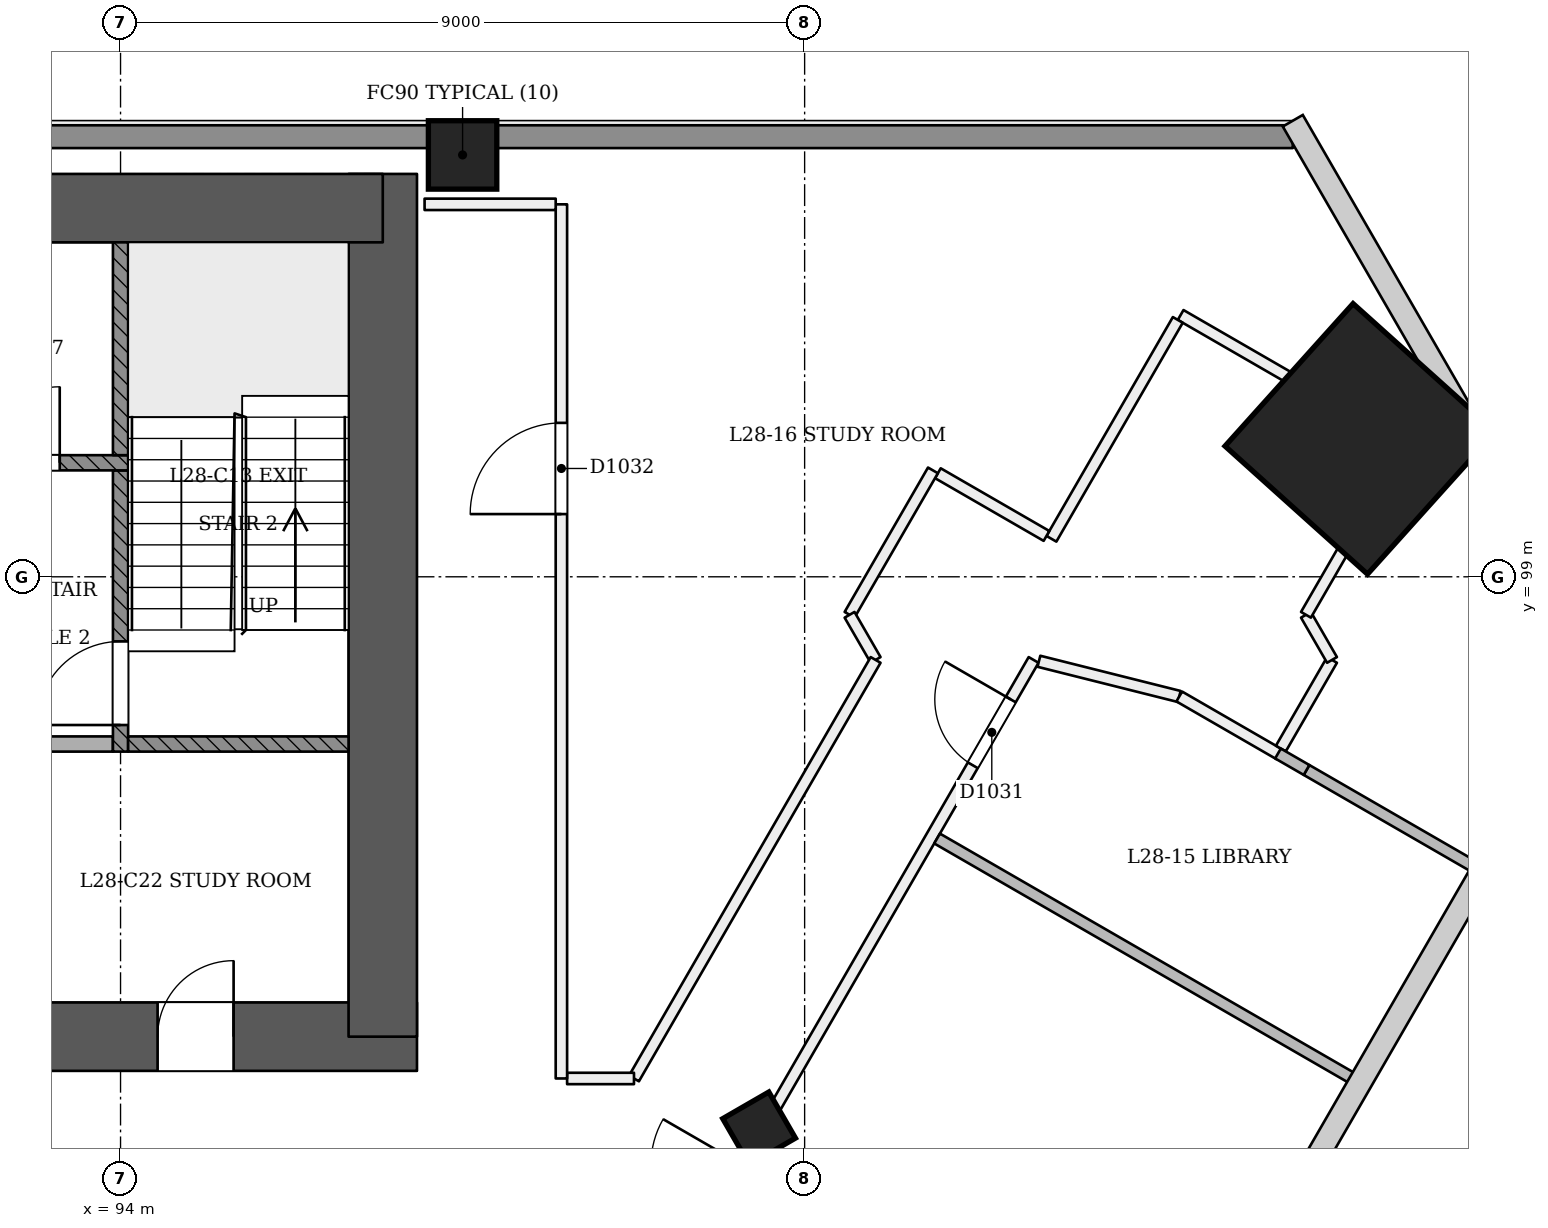
"""IFC4 building model, lengths in metres.
Left out: names, types, materials, properties, quantities, classifications, styles, units other than length and angle.
Written with IfcOpenShell. Run it as: python <this file> out.ifc"""

import sys

from ifc_helpers import new_model, si_unit, direction, frame, frame_2d, origin, origin_2d, place, context, subcontext, project, spatial, rectangle, extrude, element, fill, save


model = new_model("IFC4")
c1 = context("Model", 3, precision=1e-05, world=origin(), true_north=direction((0.0, 1.0)))
c2 = subcontext(c1, "Body", "Model", "MODEL_VIEW")
j1 = project(units=[si_unit("LENGTHUNIT", "METRE"), si_unit("PLANEANGLEUNIT", "RADIAN")], contexts=[c1])
p1 = place(None, origin())
s1 = spatial("IfcSite", under=j1, at=p1, CompositionType="ELEMENT")
p2 = place(p1, origin())
s2 = spatial("IfcBuilding", under=s1, at=p2, CompositionType="ELEMENT")
p3 = place(p2, frame((0.0, 0.0, 111.6)))
s3 = spatial("IfcBuildingStorey", under=s2, at=p3, CompositionType="ELEMENT", Elevation=111.6)
p4 = place(p3, frame((72.55, 92.95, 0.0), z_axis=(0.0, 0.0, 1.0), x_axis=(1.0, 0.0, 0.0)))
e1 = element("IfcWall", 1, at=p4, inside=s3, PredefinedType="SHEAR", context=c2, shape_type="SweptSolid", body=[
    extrude(rectangle(XDim=25.35, YDim=0.9, at=frame_2d((12.675, 0.0))), origin(), (0.0, 0.0, 1.0), 3.6),
])
p5 = place(p4, frame((1.25, 0.0, 0.0)))
e2 = element("IfcOpeningElement", 2, at=p5, cuts=e1, PredefinedType="OPENING", context=c2, shape_type="SweptSolid", body=[
    extrude(rectangle(XDim=1.2, YDim=2.1, at=frame_2d((0.6, 1.05))), frame((0.0, 0.46, 0.0), z_axis=(0.0, -1.0, 0.0), x_axis=(1.0, 0.0, 0.0)), (0.0, 0.0, 1.0), 0.921),
])
p6 = place(p4, frame((3.45, 0.0, 0.0)))
e3 = element("IfcOpeningElement", 3, at=p6, cuts=e1, PredefinedType="OPENING", context=c2, shape_type="SweptSolid", body=[
    extrude(rectangle(XDim=1.2, YDim=2.1, at=frame_2d((0.6, 1.05))), frame((0.0, 0.46, 0.0), z_axis=(0.0, -1.0, 0.0), x_axis=(1.0, 0.0, 0.0)), (0.0, 0.0, 1.0), 0.921),
])
p7 = place(p4, frame((13.45, 0.0, 0.0)))
e4 = element("IfcOpeningElement", 4, at=p7, cuts=e1, PredefinedType="OPENING", context=c2, shape_type="SweptSolid", body=[
    extrude(rectangle(XDim=1.2, YDim=2.1, at=frame_2d((0.6, 1.05))), frame((0.0, 0.46, 0.0), z_axis=(0.0, -1.0, 0.0), x_axis=(1.0, 0.0, 0.0)), (0.0, 0.0, 1.0), 0.921),
])
p8 = place(p4, frame((15.712, 0.0, 0.0)))
e5 = element("IfcOpeningElement", 5, at=p8, cuts=e1, PredefinedType="OPENING", context=c2, shape_type="SweptSolid", body=[
    extrude(rectangle(XDim=1.0, YDim=2.1, at=frame_2d((0.5, 1.05))), frame((0.0, 0.46, 0.0), z_axis=(0.0, -1.0, 0.0), x_axis=(1.0, 0.0, 0.0)), (0.0, 0.0, 1.0), 0.921),
])
p9 = place(p4, frame((18.35, 0.0, 0.0)))
e6 = element("IfcOpeningElement", 6, at=p9, cuts=e1, PredefinedType="OPENING", context=c2, shape_type="SweptSolid", body=[
    extrude(rectangle(XDim=1.0, YDim=2.1, at=frame_2d((0.5, 1.05))), frame((0.0, 0.46, 0.0), z_axis=(0.0, -1.0, 0.0), x_axis=(1.0, 0.0, 0.0)), (0.0, 0.0, 1.0), 0.921),
])
p10 = place(p4, frame((21.938, 0.0, 0.0)))
e7 = element("IfcOpeningElement", 7, at=p10, cuts=e1, PredefinedType="OPENING", context=c2, shape_type="SweptSolid", body=[
    extrude(rectangle(XDim=1.0, YDim=2.1, at=frame_2d((0.5, 1.05))), frame((0.0, 0.46, 0.0), z_axis=(0.0, -1.0, 0.0), x_axis=(1.0, 0.0, 0.0)), (0.0, 0.0, 1.0), 0.921),
])
p11 = place(p3, frame((97.45, 92.95, 0.0), z_axis=(0.0, 0.0, 1.0), x_axis=(0.0, 1.0, 0.0)))
e8 = element("IfcWall", 8, at=p11, inside=s3, PredefinedType="SHEAR", context=c2, shape_type="SweptSolid", body=[
    extrude(rectangle(XDim=11.35, YDim=0.9, at=frame_2d((5.675, 0.0))), origin(), (0.0, 0.0, 1.0), 3.6),
])
p12 = place(p3, frame((97.45, 103.85, 0.0), z_axis=(0.0, 0.0, 1.0), x_axis=(-1.0, 0.0, 0.0)))
e9 = element("IfcWall", 9, at=p12, inside=s3, PredefinedType="SHEAR", context=c2, shape_type="SweptSolid", body=[
    extrude(rectangle(XDim=25.35, YDim=0.9, at=frame_2d((12.675, 0.0))), origin(), (0.0, 0.0, 1.0), 3.6),
])
p13 = place(p3, frame((102.428, 91.696, -0.021), z_axis=(-0.022155133694, 0.038483534979, 0.999013597298), x_axis=(-0.501317552426, -0.864978472218, 0.022202572572)))
e10 = element("IfcColumn", 10, at=p13, inside=s3, PredefinedType="COLUMN", context=c2, shape_type="SweptSolid", body=[
    extrude(rectangle(XDim=0.7, YDim=0.7, at=origin_2d()), origin(), (0.0, 0.0, 1.0), 3.604),
])
p14 = place(p3, frame((110.344, 100.803, 0.0), z_axis=(-0.028336004223, 0.009219369795, 0.999555938447), x_axis=(0.500148463849, -0.865656006757, 0.022162853497)))
e11 = element("IfcColumn", 11, at=p14, inside=s3, PredefinedType="COLUMN", context=c2, shape_type="SweptSolid", body=[
    extrude(rectangle(XDim=2.52, YDim=2.52, at=origin_2d()), origin(), (0.0, 0.0, 1.0), 3.602),
])
p15 = place(p3, frame((98.5, 104.55, 0.0), z_axis=(0.0, 0.0, 1.0), x_axis=(1.0, 0.0, 0.0)))
e12 = element("IfcColumn", 12, at=p15, inside=s3, PredefinedType="COLUMN", context=c2, shape_type="SweptSolid", body=[
    extrude(rectangle(XDim=0.9, YDim=0.9, at=origin_2d()), origin(), (0.0, 0.0, 1.0), 3.6),
])
p16 = place(p3, frame((85.343, 62.105, 0.0), z_axis=(0.0, 0.0, 1.0), x_axis=(0.500001579174, 0.866024492046, 0.0)))
e13 = element("IfcWall", 13, at=p16, inside=s3, PredefinedType="PARTITIONING", context=c2, shape_type="SweptSolid", body=[
    extrude(rectangle(XDim=41.339, YDim=0.15, at=frame_2d((20.669, 0.0))), origin(), (0.0, 0.0, 1.0), 2.7),
])
p17 = place(p16, frame((0.312, 0.0, 0.0)))
e14 = element("IfcOpeningElement", 14, at=p17, cuts=e13, PredefinedType="OPENING", context=c2, shape_type="SweptSolid", body=[
    extrude(rectangle(XDim=1.2, YDim=2.1, at=frame_2d((0.6, 1.05))), frame((0.0, 0.085, 0.0), z_axis=(0.0, -1.0, 0.0), x_axis=(1.0, 0.0, 0.0)), (0.0, 0.0, 1.0), 0.171),
])
p18 = place(p16, frame((8.82, 0.0, 0.0)))
e15 = element("IfcOpeningElement", 15, at=p18, cuts=e13, PredefinedType="OPENING", context=c2, shape_type="SweptSolid", body=[
    extrude(rectangle(XDim=1.2, YDim=2.1, at=frame_2d((0.6, 1.05))), frame((0.0, 0.085, 0.0), z_axis=(0.0, -1.0, 0.0), x_axis=(1.0, 0.0, 0.0)), (0.0, 0.0, 1.0), 0.171),
])
p19 = place(p16, frame((22.32, 0.0, 0.0)))
e16 = element("IfcOpeningElement", 16, at=p19, cuts=e13, PredefinedType="OPENING", context=c2, shape_type="SweptSolid", body=[
    extrude(rectangle(XDim=1.2, YDim=2.1, at=frame_2d((0.6, 1.05))), frame((0.0, 0.085, 0.0), z_axis=(0.0, -1.0, 0.0), x_axis=(1.0, 0.0, 0.0)), (0.0, 0.0, 1.0), 0.171),
])
p20 = place(p16, frame((32.47, 0.0, 0.0)))
e17 = element("IfcOpeningElement", 17, at=p20, cuts=e13, PredefinedType="OPENING", context=c2, shape_type="SweptSolid", body=[
    extrude(rectangle(XDim=1.2, YDim=2.1, at=frame_2d((0.6, 1.05))), frame((0.0, 0.085, 0.0), z_axis=(0.0, -1.0, 0.0), x_axis=(1.0, 0.0, 0.0)), (0.0, 0.0, 1.0), 0.171),
])
p21 = place(p16, frame((39.739, 0.0, 0.0)))
e18 = element("IfcOpeningElement", 18, at=p21, cuts=e13, PredefinedType="OPENING", context=c2, shape_type="SweptSolid", body=[
    extrude(rectangle(XDim=1.0, YDim=2.1, at=frame_2d((0.5, 1.05))), frame((0.0, 0.085, 0.0), z_axis=(0.0, -1.0, 0.0), x_axis=(1.0, 0.0, 0.0)), (0.0, 0.0, 1.0), 0.171),
])
p22 = place(p3, frame((106.082, 97.889, 0.0), z_axis=(0.0, 0.0, 1.0), x_axis=(0.969923333145, -0.24341061567, 0.0)))
e19 = element("IfcWall", 19, at=p22, inside=s3, PredefinedType="PARTITIONING", context=c2, shape_type="SweptSolid", body=[
    extrude(rectangle(XDim=1.904, YDim=0.15, at=frame_2d((0.952, 0.0))), origin(), (0.0, 0.0, 1.0), 3.1),
])
p23 = place(p3, frame((107.929, 97.425, 0.0), z_axis=(0.0, 0.0, 1.0), x_axis=(0.866030456496, -0.499991248344, 0.0)))
e20 = element("IfcWall", 20, at=p23, inside=s3, PredefinedType="PARTITIONING", context=c2, shape_type="SweptSolid", body=[
    extrude(rectangle(XDim=1.52, YDim=0.15, at=frame_2d((0.76, 0.0))), origin(), (0.0, 0.0, 1.0), 2.6),
])
p24 = place(p3, frame((109.265, 96.74, 0.0), z_axis=(0.0, 0.0, 1.0), x_axis=(0.500078207394, 0.865980246016, 0.0)))
e21 = element("IfcWall", 21, at=p24, inside=s3, PredefinedType="PARTITIONING", context=c2, shape_type="SweptSolid", body=[
    extrude(rectangle(XDim=1.346, YDim=0.15, at=frame_2d((0.673, 0.0))), origin(), (0.0, 0.0, 1.0), 2.6),
])
p25 = place(p3, frame((109.938, 97.906, 0.0), z_axis=(0.0, 0.0, 1.0), x_axis=(-0.500236074689, 0.865889063091, 0.0)))
e22 = element("IfcWall", 22, at=p25, inside=s3, PredefinedType="PARTITIONING", context=c2, shape_type="SweptSolid", body=[
    extrude(rectangle(XDim=0.686, YDim=0.15, at=frame_2d((0.343, 0.0))), origin(), (0.0, 0.0, 1.0), 2.6),
])
p26 = place(p3, frame((109.595, 98.5, 0.0), z_axis=(0.0, 0.0, 1.0), x_axis=(0.500072327845, 0.865983641256, 0.0)))
e23 = element("IfcWall", 23, at=p26, inside=s3, PredefinedType="PARTITIONING", context=c2, shape_type="SweptSolid", body=[
    extrude(rectangle(XDim=2.517, YDim=0.15, at=frame_2d((1.258, 0.0))), origin(), (0.0, 0.0, 1.0), 2.6),
])
p27 = place(p3, frame((110.891, 100.744, 0.0), z_axis=(0.0, 0.0, 1.0), x_axis=(-0.865989465428, 0.500062241894, 0.0)))
e24 = element("IfcWall", 24, at=p27, inside=s3, PredefinedType="PARTITIONING", context=c2, shape_type="SweptSolid", body=[
    extrude(rectangle(XDim=3.4, YDim=0.15, at=frame_2d((1.7, 0.0))), origin(), (0.0, 0.0, 1.0), 2.6),
])
p28 = place(p3, frame((107.909, 102.38, 0.0), z_axis=(0.0, 0.0, 1.0), x_axis=(-0.500008456887, -0.866020521143, 0.0)))
e25 = element("IfcWall", 25, at=p28, inside=s3, PredefinedType="PARTITIONING", context=c2, shape_type="SweptSolid", body=[
    extrude(rectangle(XDim=3.325, YDim=0.15, at=frame_2d((1.663, 0.0))), origin(), (0.0, 0.0, 1.0), 2.6),
])
p29 = place(p3, frame((106.182, 99.538, 0.0), z_axis=(0.0, 0.0, 1.0), x_axis=(-0.866040211805, 0.499974350878, 0.0)))
e26 = element("IfcWall", 26, at=p29, inside=s3, PredefinedType="PARTITIONING", context=c2, shape_type="SweptSolid", body=[
    extrude(rectangle(XDim=1.65, YDim=0.15, at=frame_2d((0.825, 0.0))), origin(), (0.0, 0.0, 1.0), 3.1),
])
p30 = place(p3, frame((104.688, 100.4, 0.0), z_axis=(0.0, 0.0, 1.0), x_axis=(-0.500005024956, -0.866022502605, 0.0)))
e27 = element("IfcWall", 27, at=p30, inside=s3, PredefinedType="PARTITIONING", context=c2, shape_type="SweptSolid", body=[
    extrude(rectangle(XDim=2.194, YDim=0.15, at=frame_2d((1.097, 0.0))), origin(), (0.0, 0.0, 1.0), 3.1),
])
p31 = place(p3, frame((103.591, 98.5, 0.0), z_axis=(0.0, 0.0, 1.0), x_axis=(0.499969057507, -0.866043267704, 0.0)))
e28 = element("IfcWall", 28, at=p31, inside=s3, PredefinedType="PARTITIONING", context=c2, shape_type="SweptSolid", body=[
    extrude(rectangle(XDim=0.686, YDim=0.15, at=frame_2d((0.343, 0.0))), origin(), (0.0, 0.0, 1.0), 3.1),
])
p32 = place(p3, frame((103.934, 97.906, 0.0), z_axis=(0.0, 0.0, 1.0), x_axis=(-0.499983931063, -0.866034680991, 0.0)))
e29 = element("IfcWall", 29, at=p32, inside=s3, PredefinedType="PARTITIONING", context=c2, shape_type="SweptSolid", body=[
    extrude(rectangle(XDim=6.358, YDim=0.15, at=frame_2d((3.179, 0.0))), origin(), (0.0, 0.0, 1.0), 3.1),
])
p33 = place(p3, frame((100.755, 92.4, 0.0), z_axis=(0.0, 0.0, 1.0), x_axis=(-1.0, 0.0, 0.0)))
e30 = element("IfcWall", 30, at=p33, inside=s3, PredefinedType="PARTITIONING", context=c2, shape_type="SweptSolid", body=[
    extrude(rectangle(XDim=0.88, YDim=0.15, at=frame_2d((0.44, 0.0))), origin(), (0.0, 0.0, 1.0), 3.1),
])
p34 = place(p3, frame((99.8, 92.4, 0.0), z_axis=(0.0, 0.0, 1.0), x_axis=(0.0, 1.0, 0.0)))
e31 = element("IfcWall", 31, at=p34, inside=s3, PredefinedType="PARTITIONING", context=c2, shape_type="SweptSolid", body=[
    extrude(rectangle(XDim=11.5, YDim=0.15, at=frame_2d((5.75, 0.0))), origin(), (0.0, 0.0, 1.0), 2.6),
])
p35 = place(p34, frame((7.425, 0.0, 0.0)))
e32 = element("IfcOpeningElement", 32, at=p35, cuts=e31, PredefinedType="OPENING", context=c2, shape_type="SweptSolid", body=[
    extrude(rectangle(XDim=1.2, YDim=2.1, at=frame_2d((0.6, 1.05))), frame((0.0, 0.085, 0.0), z_axis=(0.0, -1.0, 0.0), x_axis=(1.0, 0.0, 0.0)), (0.0, 0.0, 1.0), 0.171),
])
p36 = place(p3, frame((99.725, 103.9, 0.0), z_axis=(0.0, 0.0, 1.0), x_axis=(-1.0, 0.0, 0.0)))
e33 = element("IfcWall", 33, at=p36, inside=s3, PredefinedType="PARTITIONING", context=c2, shape_type="SweptSolid", body=[
    extrude(rectangle(XDim=1.725, YDim=0.15, at=frame_2d((0.863, 0.0))), origin(), (0.0, 0.0, 1.0), 2.6),
])
p37 = place(p3, frame((110.22, 92.394, 0.0), z_axis=(0.0, 0.0, 1.0), x_axis=(-0.866015887322, 0.500016482634, 0.0)))
e34 = element("IfcWall", 34, at=p37, inside=s3, PredefinedType="PARTITIONING", context=c2, shape_type="SweptSolid", body=[
    extrude(rectangle(XDim=6.325, YDim=0.15, at=frame_2d((3.163, 0.0))), origin(), (0.0, 0.0, 1.0), 2.6),
])
p38 = place(p3, frame((111.826, 95.175, 0.0), z_axis=(0.0, 0.0, 1.0), x_axis=(-0.866009728883, 0.500027148743, 0.0)))
e35 = element("IfcWall", 35, at=p38, inside=s3, PredefinedType="PARTITIONING", context=c2, shape_type="SweptSolid", body=[
    extrude(rectangle(XDim=2.566, YDim=0.15, at=frame_2d((1.283, 0.0))), origin(), (0.0, 0.0, 1.0), 3.1),
])
p39 = place(p3, frame((109.603, 96.458, 0.0), z_axis=(0.0, 0.0, 1.0), x_axis=(-0.866016800201, 0.500014901547, 0.0)))
e36 = element("IfcWall", 36, at=p39, inside=s3, PredefinedType="PARTITIONING", context=c2, shape_type="SweptSolid", body=[
    extrude(rectangle(XDim=0.434, YDim=0.15, at=frame_2d((0.217, 0.0))), origin(), (0.0, 0.0, 1.0), 2.6),
])
p40 = place(p3, frame((60.578, 104.79, 0.0), z_axis=(0.0, 0.0, 1.0), x_axis=(1.0, 0.0, 0.0)))
e37 = element("IfcWall", 37, at=p40, inside=s3, PredefinedType="SOLIDWALL", context=c2, shape_type="SweptSolid", body=[
    extrude(rectangle(XDim=48.845, YDim=0.3, at=frame_2d((24.422, 0.0))), origin(), (0.0, 0.0, 1.0), 2.6),
])
p41 = place(p3, frame((91.5, 96.8, 0.0), z_axis=(0.0, 0.0, 1.0), x_axis=(1.0, 0.0, 0.0)))
e38 = element("IfcWall", 38, at=p41, inside=s3, PredefinedType="PARTITIONING", context=c2, shape_type="SweptSolid", body=[
    extrude(rectangle(XDim=2.4, YDim=0.2, at=frame_2d((1.2, 0.0))), origin(), (0.0, 0.0, 1.0), 3.1),
])
p42 = place(p3, frame((94.0, 96.7, 0.0), z_axis=(0.0, 0.0, 1.0), x_axis=(0.0, 1.0, 0.0)))
e39 = element("IfcWall", 39, at=p42, inside=s3, PredefinedType="SOLIDWALL", context=c2, shape_type="SweptSolid", body=[
    extrude(rectangle(XDim=3.7, YDim=0.2, at=frame_2d((1.85, 0.0))), origin(), (0.0, 0.0, 1.0), 3.1),
])
p43 = place(p42, frame((0.35, 0.0, 0.0)))
e40 = element("IfcOpeningElement", 40, at=p43, cuts=e39, PredefinedType="OPENING", context=c2, shape_type="SweptSolid", body=[
    extrude(rectangle(XDim=1.1, YDim=2.1, at=frame_2d((0.55, 1.05))), frame((0.0, 0.11, 0.0), z_axis=(0.0, -1.0, 0.0), x_axis=(1.0, 0.0, 0.0)), (0.0, 0.0, 1.0), 0.221),
])
p44 = place(p3, frame((94.1, 96.8, 0.0), z_axis=(0.0, 0.0, 1.0), x_axis=(1.0, 0.0, 0.0)))
e41 = element("IfcWall", 41, at=p44, inside=s3, PredefinedType="SOLIDWALL", context=c2, shape_type="SweptSolid", body=[
    extrude(rectangle(XDim=2.9, YDim=0.2, at=frame_2d((1.45, 0.0))), origin(), (0.0, 0.0, 1.0), 3.1),
])
p45 = place(p3, frame((75.9, 100.5, 0.0), z_axis=(0.0, 0.0, 1.0), x_axis=(1.0, 0.0, 0.0)))
e42 = element("IfcWall", 42, at=p45, inside=s3, PredefinedType="SOLIDWALL", context=c2, shape_type="SweptSolid", body=[
    extrude(rectangle(XDim=18.2, YDim=0.2, at=frame_2d((9.1, 0.0))), origin(), (0.0, 0.0, 1.0), 3.1),
])
p46 = place(p45, frame((2.6, 0.0, 0.0)))
e43 = element("IfcOpeningElement", 43, at=p46, cuts=e42, PredefinedType="OPENING", context=c2, shape_type="SweptSolid", body=[
    extrude(rectangle(XDim=1.1, YDim=2.1, at=frame_2d((0.55, 1.05))), frame((0.0, 0.11, 0.0), z_axis=(0.0, -1.0, 0.0), x_axis=(1.0, 0.0, 0.0)), (0.0, 0.0, 1.0), 0.221),
])
p47 = place(p45, frame((4.5, 0.0, 0.0)))
e44 = element("IfcOpeningElement", 44, at=p47, cuts=e42, PredefinedType="OPENING", context=c2, shape_type="SweptSolid", body=[
    extrude(rectangle(XDim=1.1, YDim=2.1, at=frame_2d((0.55, 1.05))), frame((0.0, 0.11, 0.0), z_axis=(0.0, -1.0, 0.0), x_axis=(1.0, 0.0, 0.0)), (0.0, 0.0, 1.0), 0.221),
])
p48 = place(p45, frame((6.4, 0.0, 0.0)))
e45 = element("IfcOpeningElement", 45, at=p48, cuts=e42, PredefinedType="OPENING", context=c2, shape_type="SweptSolid", body=[
    extrude(rectangle(XDim=1.1, YDim=2.1, at=frame_2d((0.55, 1.05))), frame((0.0, 0.11, 0.0), z_axis=(0.0, -1.0, 0.0), x_axis=(1.0, 0.0, 0.0)), (0.0, 0.0, 1.0), 0.221),
])
p49 = place(p45, frame((8.3, 0.0, 0.0)))
e46 = element("IfcOpeningElement", 46, at=p49, cuts=e42, PredefinedType="OPENING", context=c2, shape_type="SweptSolid", body=[
    extrude(rectangle(XDim=1.1, YDim=2.1, at=frame_2d((0.55, 1.05))), frame((0.0, 0.11, 0.0), z_axis=(0.0, -1.0, 0.0), x_axis=(1.0, 0.0, 0.0)), (0.0, 0.0, 1.0), 0.221),
])
p50 = place(p45, frame((10.2, 0.0, 0.0)))
e47 = element("IfcOpeningElement", 47, at=p50, cuts=e42, PredefinedType="OPENING", context=c2, shape_type="SweptSolid", body=[
    extrude(rectangle(XDim=1.1, YDim=2.1, at=frame_2d((0.55, 1.05))), frame((0.0, 0.11, 0.0), z_axis=(0.0, -1.0, 0.0), x_axis=(1.0, 0.0, 0.0)), (0.0, 0.0, 1.0), 0.221),
])
p51 = place(p45, frame((12.1, 0.0, 0.0)))
e48 = element("IfcOpeningElement", 48, at=p51, cuts=e42, PredefinedType="OPENING", context=c2, shape_type="SweptSolid", body=[
    extrude(rectangle(XDim=1.1, YDim=2.1, at=frame_2d((0.55, 1.05))), frame((0.0, 0.11, 0.0), z_axis=(0.0, -1.0, 0.0), x_axis=(1.0, 0.0, 0.0)), (0.0, 0.0, 1.0), 0.221),
])
p52 = place(p45, frame((14.0, 0.0, 0.0)))
e49 = element("IfcOpeningElement", 49, at=p52, cuts=e42, PredefinedType="OPENING", context=c2, shape_type="SweptSolid", body=[
    extrude(rectangle(XDim=1.1, YDim=2.1, at=frame_2d((0.55, 1.05))), frame((0.0, 0.11, 0.0), z_axis=(0.0, -1.0, 0.0), x_axis=(1.0, 0.0, 0.0)), (0.0, 0.0, 1.0), 0.221),
])
p53 = place(p45, frame((0.65, 0.0, 0.0)))
e50 = element("IfcOpeningElement", 50, at=p53, cuts=e42, PredefinedType="OPENING", context=c2, shape_type="SweptSolid", body=[
    extrude(rectangle(XDim=1.0, YDim=2.1, at=frame_2d((0.5, 1.05))), frame((0.0, 0.11, 0.0), z_axis=(0.0, -1.0, 0.0), x_axis=(1.0, 0.0, 0.0)), (0.0, 0.0, 1.0), 0.221),
])
p54 = place(p45, frame((16.3, 0.0, 0.0)))
e51 = element("IfcOpeningElement", 51, at=p54, cuts=e42, PredefinedType="OPENING", context=c2, shape_type="SweptSolid", body=[
    extrude(rectangle(XDim=1.0, YDim=2.1, at=frame_2d((0.5, 1.05))), frame((0.0, 0.11, 0.0), z_axis=(0.0, -1.0, 0.0), x_axis=(1.0, 0.0, 0.0)), (0.0, 0.0, 1.0), 0.221),
])
p55 = place(p3, frame((94.0, 100.6, 0.0), z_axis=(0.0, 0.0, 1.0), x_axis=(0.0, 1.0, 0.0)))
e52 = element("IfcWall", 52, at=p55, inside=s3, PredefinedType="SOLIDWALL", context=c2, shape_type="SweptSolid", body=[
    extrude(rectangle(XDim=2.8, YDim=0.2, at=frame_2d((1.4, 0.0))), origin(), (0.0, 0.0, 1.0), 3.1),
])
p56 = place(p21, origin())
e53 = element("IfcDoor", 53, at=p56, inside=s3, OperationType="SINGLE_SWING_RIGHT", PredefinedType="NOTDEFINED", context=c2, shape_type="SweptSolid", body=[
    extrude(rectangle(XDim=1.0, YDim=2.1, at=frame_2d((0.5, 1.05))), frame((0.0, 0.025, 0.0), z_axis=(0.0, -1.0, 0.0), x_axis=(1.0, 0.0, 0.0)), (0.0, 0.0, 1.0), 0.05),
])
fill(e18, e53)
p57 = place(p35, origin())
e54 = element("IfcDoor", 54, at=p57, inside=s3, OperationType="SINGLE_SWING_LEFT", PredefinedType="NOTDEFINED", context=c2, shape_type="SweptSolid", body=[
    extrude(rectangle(XDim=1.2, YDim=2.1, at=frame_2d((0.6, 1.05))), frame((0.0, 0.025, 0.0), z_axis=(0.0, -1.0, 0.0), x_axis=(1.0, 0.0, 0.0)), (0.0, 0.0, 1.0), 0.05),
])
fill(e32, e54)
p58 = place(p43, origin())
e55 = element("IfcDoor", 55, at=p58, inside=s3, OperationType="SINGLE_SWING_LEFT", PredefinedType="NOTDEFINED", context=c2, shape_type="SweptSolid", body=[
    extrude(rectangle(XDim=1.1, YDim=2.1, at=frame_2d((0.55, 1.05))), frame((0.0, 0.025, 0.0), z_axis=(0.0, -1.0, 0.0), x_axis=(1.0, 0.0, 0.0)), (0.0, 0.0, 1.0), 0.05),
])
fill(e40, e55)
p59 = place(p54, origin())
e56 = element("IfcDoor", 56, at=p59, inside=s3, OperationType="SINGLE_SWING_RIGHT", PredefinedType="NOTDEFINED", context=c2, shape_type="SweptSolid", body=[
    extrude(rectangle(XDim=1.0, YDim=2.1, at=frame_2d((0.5, 1.05))), frame((0.0, 0.025, 0.0), z_axis=(0.0, -1.0, 0.0), x_axis=(1.0, 0.0, 0.0)), (0.0, 0.0, 1.0), 0.05),
])
fill(e51, e56)
p60 = place(p10, origin())
e57 = element("IfcDoor", 57, at=p60, inside=s3, OperationType="SINGLE_SWING_RIGHT", PredefinedType="NOTDEFINED", context=c2, shape_type="SweptSolid", body=[
    extrude(rectangle(XDim=1.0, YDim=2.1, at=frame_2d((0.5, 1.05))), frame((0.0, 0.025, 0.0), z_axis=(0.0, -1.0, 0.0), x_axis=(1.0, 0.0, 0.0)), (0.0, 0.0, 1.0), 0.05),
])
fill(e7, e57)
save(model, sys.argv[1])
